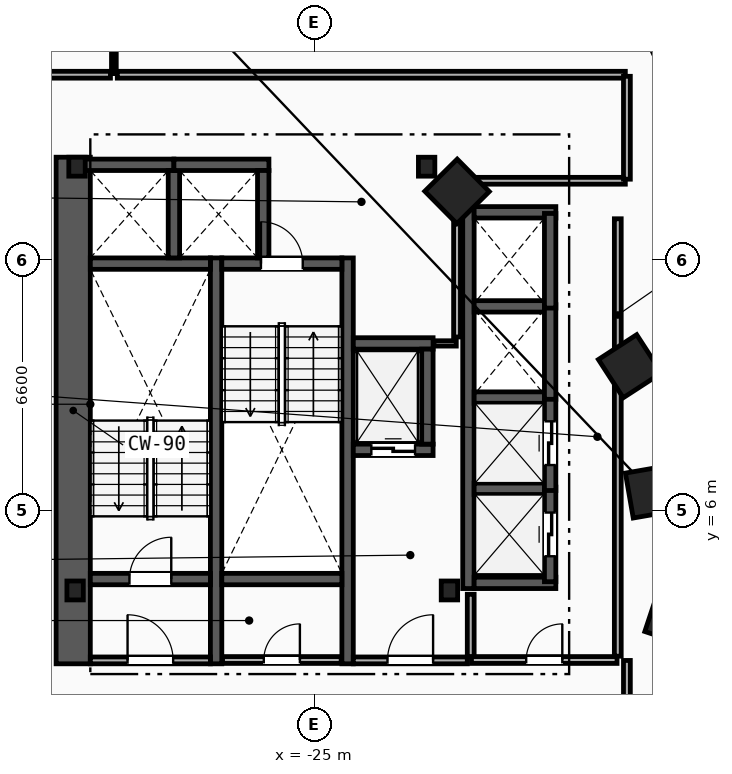
"""IFC4 building model, lengths in metres.
Left out: names, types, materials, properties, quantities, classifications, styles, units other than length and angle.
Written with IfcOpenShell. Run it as: python <this file> out.ifc"""

import sys

from ifc_helpers import new_model, si_unit, direction, frame, frame_2d, origin, origin_2d, place, context, subcontext, project, spatial, rectangle, i_section, extrude, element, fill, save


model = new_model("IFC4")
c1 = context("Model", 3, precision=1e-05, world=origin(), true_north=direction((0.0, 1.0)))
c2 = subcontext(c1, "Body", "Model", "MODEL_VIEW")
j1 = project(units=[si_unit("LENGTHUNIT", "METRE"), si_unit("PLANEANGLEUNIT", "RADIAN")], contexts=[c1])
p1 = place(None, origin())
s1 = spatial("IfcSite", under=j1, at=p1, CompositionType="ELEMENT")
p2 = place(p1, origin())
s2 = spatial("IfcBuilding", under=s1, at=p2, CompositionType="ELEMENT")
p3 = place(p2, frame((0.0, 0.0, 54.4)))
s3 = spatial("IfcBuildingStorey", under=s2, at=p3, CompositionType="ELEMENT", Elevation=54.4)
for number, where, z_axis, x_axis in (
    (1, (-31.3, 3.9, 0.0), (0.0, 0.0, 1.0), (1.0, 0.0, 0.0)),
    (2, (-21.45, 3.9, 0.0), (0.0, 0.0, 1.0), (1.0, 0.0, 0.0)),
    (3, (-22.05, 15.05, 0.0), (0.0, 0.0, 1.0), (1.0, 0.0, 0.0)),
    (4, (-31.25, 15.05, 0.0), (0.0, 0.0, 1.0), (1.0, 0.0, 0.0)),
):
    element("IfcColumn", number, at=place(p3, frame(where, z_axis=z_axis, x_axis=x_axis)), inside=s3, PredefinedType="COLUMN", context=c2, shape_type="SweptSolid", body=[
        extrude(i_section(OverallWidth=0.432, OverallDepth=0.498, WebThickness=0.056, FlangeThickness=0.089, FilletRadius=0.018, at=origin_2d()), origin(), (0.0, 0.0, 1.0), 3.8),
    ])
for number, where, z_axis, x_axis in (
    (5, (-15.55, 3.2, 0.0), (0.0, 0.0, 1.0), (0.315, 0.949, 0.0)),
    (6, (-16.125, 6.5, 0.0), (0.0, 0.0, 1.0), (-0.172, 0.985, 0.0)),
    (7, (-16.7, 9.8, 0.0), (0.0, 0.0, 1.0), (-0.544, 0.839, 0.0)),
    (8, (-21.25, 14.4, 0.0), (0.0, 0.0, 1.0), (-0.703, 0.711, 0.0)),
):
    element("IfcColumn", number, at=place(p3, frame(where, z_axis=z_axis, x_axis=x_axis)), inside=s3, PredefinedType="COLUMN", context=c2, shape_type="SweptSolid", body=[
        extrude(rectangle(XDim=1.2, YDim=1.2, at=origin_2d()), origin(), (0.0, 0.0, 1.0), 3.8),
    ])
p4 = place(p3, frame((-31.35, 1.97, 0.0), z_axis=(0.0, 0.0, 1.0), x_axis=(0.0, 1.0, 0.0)))
e9 = element("IfcWall", 9, at=p4, inside=s3, PredefinedType="SHEAR", context=c2, shape_type="SweptSolid", body=[
    extrude(rectangle(XDim=13.33, YDim=0.9, at=frame_2d((6.665, 0.0))), origin(), (0.0, 0.0, 1.0), 3.5),
])
for number, where, z_axis, x_axis in (
    (10, (-27.59, 1.97, 0.0), (0.0, 0.0, 1.0), (0.0, 1.0, 0.0)),
    (11, (-24.13, 1.97, 0.0), (0.0, 0.0, 1.0), (0.0, 1.0, 0.0)),
):
    element("IfcWall", number, at=place(p3, frame(where, z_axis=z_axis, x_axis=x_axis)), inside=s3, PredefinedType="SHEAR", context=c2, shape_type="SweptSolid", body=[
        extrude(rectangle(XDim=10.68, YDim=0.3, at=frame_2d((5.34, 0.0))), origin(), (0.0, 0.0, 1.0), 3.5),
    ])
p5 = place(p3, frame((-30.9, 4.2, 0.0), z_axis=(0.0, 0.0, 1.0), x_axis=(1.0, 0.0, 0.0)))
e12 = element("IfcWall", 12, at=p5, inside=s3, PredefinedType="SHEAR", context=c2, shape_type="SweptSolid", body=[
    extrude(rectangle(XDim=3.16, YDim=0.3, at=frame_2d((1.58, 0.0))), origin(), (0.0, 0.0, 1.0), 3.5),
])
p6 = place(p5, frame((1.03, 0.0, 0.0)))
e13 = element("IfcOpeningElement", 13, at=p6, cuts=e12, PredefinedType="OPENING", context=c2, shape_type="SweptSolid", body=[
    extrude(rectangle(XDim=1.1, YDim=2.15, at=frame_2d((0.55, 1.075))), frame((0.0, 0.16, 0.0), z_axis=(0.0, -1.0, 0.0), x_axis=(1.0, 0.0, 0.0)), (0.0, 0.0, 1.0), 0.32),
])
p7 = place(p3, frame((-30.9, 12.5, 0.0), z_axis=(0.0, 0.0, 1.0), x_axis=(1.0, 0.0, 0.0)))
e14 = element("IfcWall", 14, at=p7, inside=s3, PredefinedType="SHEAR", context=c2, shape_type="SweptSolid", body=[
    extrude(rectangle(XDim=3.16, YDim=0.3, at=frame_2d((1.58, 0.0))), origin(), (0.0, 0.0, 1.0), 3.5),
])
p8 = place(p3, frame((-27.44, 12.5, 0.0), z_axis=(0.0, 0.0, 1.0), x_axis=(1.0, 0.0, 0.0)))
e15 = element("IfcWall", 15, at=p8, inside=s3, PredefinedType="SHEAR", context=c2, shape_type="SweptSolid", body=[
    extrude(rectangle(XDim=3.16, YDim=0.3, at=frame_2d((1.58, 0.0))), origin(), (0.0, 0.0, 1.0), 3.5),
])
p9 = place(p8, frame((1.03, 0.0, 0.0)))
e16 = element("IfcOpeningElement", 16, at=p9, cuts=e15, PredefinedType="OPENING", context=c2, shape_type="SweptSolid", body=[
    extrude(rectangle(XDim=1.1, YDim=2.15, at=frame_2d((0.55, 1.075))), frame((0.0, 0.16, 0.0), z_axis=(0.0, -1.0, 0.0), x_axis=(1.0, 0.0, 0.0)), (0.0, 0.0, 1.0), 0.32),
])
p10 = place(p3, frame((-27.44, 4.2, 0.0), z_axis=(0.0, 0.0, 1.0), x_axis=(1.0, 0.0, 0.0)))
e17 = element("IfcWall", 17, at=p10, inside=s3, PredefinedType="SHEAR", context=c2, shape_type="SweptSolid", body=[
    extrude(rectangle(XDim=3.16, YDim=0.3, at=frame_2d((1.58, 0.0))), origin(), (0.0, 0.0, 1.0), 3.5),
])
p11 = place(p3, frame((-20.89, 2.15, 0.0), z_axis=(0.0, 0.0, 1.0), x_axis=(0.0, 1.0, 0.0)))
e18 = element("IfcWall", 18, at=p11, inside=s3, PredefinedType="PARTITIONING", context=c2, shape_type="SweptSolid", body=[
    extrude(rectangle(XDim=1.65, YDim=0.18, at=frame_2d((0.825, 0.0))), origin(), (0.0, 0.0, 1.0), 3.5),
])
p12 = place(p3, frame((-23.98, 2.06, 0.0), z_axis=(0.0, 0.0, 1.0), x_axis=(1.0, 0.0, 0.0)))
e19 = element("IfcWall", 19, at=p12, inside=s3, PredefinedType="PARTITIONING", context=c2, shape_type="SweptSolid", body=[
    extrude(rectangle(XDim=3.0, YDim=0.18, at=frame_2d((1.5, 0.0))), origin(), (0.0, 0.0, 1.0), 3.5),
])
p13 = place(p12, frame((0.9, 0.0, 0.0)))
e20 = element("IfcOpeningElement", 20, at=p13, cuts=e19, PredefinedType="OPENING", context=c2, shape_type="SweptSolid", body=[
    extrude(rectangle(XDim=1.2, YDim=2.15, at=frame_2d((0.6, 1.075))), frame((0.0, 0.1, 0.0), z_axis=(0.0, -1.0, 0.0), x_axis=(1.0, 0.0, 0.0)), (0.0, 0.0, 1.0), 0.2),
])
p14 = place(p3, frame((-30.9, 2.06, 0.0), z_axis=(0.0, 0.0, 1.0), x_axis=(1.0, 0.0, 0.0)))
e21 = element("IfcWall", 21, at=p14, inside=s3, PredefinedType="PARTITIONING", context=c2, shape_type="SweptSolid", body=[
    extrude(rectangle(XDim=3.16, YDim=0.18, at=frame_2d((1.58, 0.0))), origin(), (0.0, 0.0, 1.0), 3.5),
])
p15 = place(p14, frame((0.98, 0.0, 0.0)))
e22 = element("IfcOpeningElement", 22, at=p15, cuts=e21, PredefinedType="OPENING", context=c2, shape_type="SweptSolid", body=[
    extrude(rectangle(XDim=1.2, YDim=2.15, at=frame_2d((0.6, 1.075))), frame((0.0, 0.1, 0.0), z_axis=(0.0, -1.0, 0.0), x_axis=(1.0, 0.0, 0.0)), (0.0, 0.0, 1.0), 0.2),
])
p16 = place(p3, frame((-23.98, 7.6, 0.0), z_axis=(0.0, 0.0, 1.0), x_axis=(1.0, 0.0, 0.0)))
e23 = element("IfcWall", 23, at=p16, inside=s3, PredefinedType="SHEAR", context=c2, shape_type="SweptSolid", body=[
    extrude(rectangle(XDim=2.1, YDim=0.3, at=frame_2d((1.05, 0.0))), origin(), (0.0, 0.0, 1.0), 3.5),
])
p17 = place(p16, frame((0.475, 0.0, 0.0)))
e24 = element("IfcOpeningElement", 24, at=p17, cuts=e23, PredefinedType="OPENING", context=c2, shape_type="SweptSolid", body=[
    extrude(rectangle(XDim=1.15, YDim=2.2, at=frame_2d((0.575, 1.1))), frame((0.0, 0.16, 0.0), z_axis=(0.0, -1.0, 0.0), x_axis=(1.0, 0.0, 0.0)), (0.0, 0.0, 1.0), 0.32),
])
p18 = place(p3, frame((-23.98, 10.4, 0.0), z_axis=(0.0, 0.0, 1.0), x_axis=(1.0, 0.0, 0.0)))
e25 = element("IfcWall", 25, at=p18, inside=s3, PredefinedType="SHEAR", context=c2, shape_type="SweptSolid", body=[
    extrude(rectangle(XDim=2.1, YDim=0.3, at=frame_2d((1.05, 0.0))), origin(), (0.0, 0.0, 1.0), 3.5),
])
for number, where, z_axis, x_axis in (
    (26, (-22.03, 7.75, 0.0), (0.0, 0.0, 1.0), (0.0, 1.0, 0.0)),
    (27, (-31.2, 15.1, 0.0), (0.0, 0.0, 1.0), (1.0, 0.0, 0.0)),
):
    element("IfcWall", number, at=place(p3, frame(where, z_axis=z_axis, x_axis=x_axis)), inside=s3, PredefinedType="SHEAR", context=c2, shape_type="SweptSolid", body=[
        extrude(rectangle(XDim=2.5, YDim=0.3, at=frame_2d((1.25, 0.0))), origin(), (0.0, 0.0, 1.0), 3.5),
    ])
p19 = place(p3, frame((-28.7, 12.65, 0.0), z_axis=(0.0, 0.0, 1.0), x_axis=(0.0, 1.0, 0.0)))
e28 = element("IfcWall", 28, at=p19, inside=s3, PredefinedType="SHEAR", context=c2, shape_type="SweptSolid", body=[
    extrude(rectangle(XDim=2.3, YDim=0.3, at=frame_2d((1.15, 0.0))), origin(), (0.0, 0.0, 1.0), 3.5),
])
p20 = place(p3, frame((-28.7, 15.1, 0.0), z_axis=(0.0, 0.0, 1.0), x_axis=(1.0, 0.0, 0.0)))
e29 = element("IfcWall", 29, at=p20, inside=s3, PredefinedType="SHEAR", context=c2, shape_type="SweptSolid", body=[
    extrude(rectangle(XDim=2.5, YDim=0.3, at=frame_2d((1.25, 0.0))), origin(), (0.0, 0.0, 1.0), 3.5),
])
p21 = place(p3, frame((-26.35, 12.65, 0.0), z_axis=(0.0, 0.0, 1.0), x_axis=(0.0, 1.0, 0.0)))
e30 = element("IfcWall", 30, at=p21, inside=s3, PredefinedType="SHEAR", context=c2, shape_type="SweptSolid", body=[
    extrude(rectangle(XDim=2.3, YDim=0.3, at=frame_2d((1.15, 0.0))), origin(), (0.0, 0.0, 1.0), 3.5),
])
p22 = place(p3, frame((-20.95, 3.95, 0.0), z_axis=(0.0, 0.0, 1.0), x_axis=(0.0, 1.0, 0.0)))
e31 = element("IfcWall", 31, at=p22, inside=s3, PredefinedType="SHEAR", context=c2, shape_type="SweptSolid", body=[
    extrude(rectangle(XDim=10.05, YDim=0.3, at=frame_2d((5.025, 0.0))), origin(), (0.0, 0.0, 1.0), 3.5),
])
for number, where, z_axis, x_axis in (
    (32, (-20.8, 4.1, 0.0), (0.0, 0.0, 1.0), (1.0, 0.0, 0.0)),
    (33, (-20.8, 13.85, 0.0), (0.0, 0.0, 1.0), (1.0, 0.0, 0.0)),
):
    element("IfcWall", number, at=place(p3, frame(where, z_axis=z_axis, x_axis=x_axis)), inside=s3, PredefinedType="SHEAR", context=c2, shape_type="SweptSolid", body=[
        extrude(rectangle(XDim=2.15, YDim=0.3, at=frame_2d((1.075, 0.0))), origin(), (0.0, 0.0, 1.0), 3.5),
    ])
for number, where, z_axis, x_axis in (
    (34, (-20.8, 6.575, 0.0), (0.0, 0.0, 1.0), (1.0, 0.0, 0.0)),
    (35, (-20.8, 8.975, 0.0), (0.0, 0.0, 1.0), (1.0, 0.0, 0.0)),
    (36, (-20.8, 11.375, 0.0), (0.0, 0.0, 1.0), (1.0, 0.0, 0.0)),
):
    element("IfcWall", number, at=place(p3, frame(where, z_axis=z_axis, x_axis=x_axis)), inside=s3, PredefinedType="SHEAR", context=c2, shape_type="SweptSolid", body=[
        extrude(rectangle(XDim=1.85, YDim=0.3, at=frame_2d((0.925, 0.0))), origin(), (0.0, 0.0, 1.0), 3.5),
    ])
p23 = place(p3, frame((-18.8, 4.13, 0.0), z_axis=(0.0, 0.0, 1.0), x_axis=(0.0, 1.0, 0.0)))
e37 = element("IfcWall", 37, at=p23, inside=s3, PredefinedType="SHEAR", context=c2, shape_type="SweptSolid", body=[
    extrude(rectangle(XDim=2.49, YDim=0.3, at=frame_2d((1.245, 0.0))), origin(), (0.0, 0.0, 1.0), 3.5),
])
p24 = place(p23, frame((0.67, 0.0, 0.0)))
e38 = element("IfcOpeningElement", 38, at=p24, cuts=e37, PredefinedType="OPENING", context=c2, shape_type="SweptSolid", body=[
    extrude(rectangle(XDim=1.15, YDim=2.2, at=frame_2d((0.575, 1.1))), frame((0.0, 0.16, 0.0), z_axis=(0.0, -1.0, 0.0), x_axis=(1.0, 0.0, 0.0)), (0.0, 0.0, 1.0), 0.32),
])
p25 = place(p3, frame((-18.8, 6.53, 0.0), z_axis=(0.0, 0.0, 1.0), x_axis=(0.0, 1.0, 0.0)))
e39 = element("IfcWall", 39, at=p25, inside=s3, PredefinedType="SHEAR", context=c2, shape_type="SweptSolid", body=[
    extrude(rectangle(XDim=2.49, YDim=0.3, at=frame_2d((1.245, 0.0))), origin(), (0.0, 0.0, 1.0), 3.5),
])
p26 = place(p25, frame((0.67, 0.0, 0.0)))
e40 = element("IfcOpeningElement", 40, at=p26, cuts=e39, PredefinedType="OPENING", context=c2, shape_type="SweptSolid", body=[
    extrude(rectangle(XDim=1.15, YDim=2.2, at=frame_2d((0.575, 1.1))), frame((0.0, 0.16, 0.0), z_axis=(0.0, -1.0, 0.0), x_axis=(1.0, 0.0, 0.0)), (0.0, 0.0, 1.0), 0.32),
])
for number, where, z_axis, x_axis in (
    (41, (-18.8, 8.93, 0.0), (0.0, 0.0, 1.0), (0.0, 1.0, 0.0)),
    (42, (-18.8, 11.33, 0.0), (0.0, 0.0, 1.0), (0.0, 1.0, 0.0)),
):
    element("IfcWall", number, at=place(p3, frame(where, z_axis=z_axis, x_axis=x_axis)), inside=s3, PredefinedType="SHEAR", context=c2, shape_type="SweptSolid", body=[
        extrude(rectangle(XDim=2.49, YDim=0.3, at=frame_2d((1.245, 0.0))), origin(), (0.0, 0.0, 1.0), 3.5),
    ])
p27 = place(p3, frame((-17.02, 2.17, 0.0), z_axis=(0.0, 0.0, 1.0), x_axis=(0.0, 1.0, 0.0)))
e43 = element("IfcWall", 43, at=p27, inside=s3, PredefinedType="PARTITIONING", context=c2, shape_type="SweptSolid", body=[
    extrude(rectangle(XDim=11.51, YDim=0.18, at=frame_2d((5.755, 0.0))), origin(), (0.0, 0.0, 1.0), 3.5),
])
p28 = place(p3, frame((-20.87, 2.07, 0.0), z_axis=(0.0, 0.0, 1.0), x_axis=(1.0, 0.0, 0.0)))
e44 = element("IfcWall", 44, at=p28, inside=s3, PredefinedType="PARTITIONING", context=c2, shape_type="SweptSolid", body=[
    extrude(rectangle(XDim=3.83, YDim=0.18, at=frame_2d((1.915, 0.0))), origin(), (0.0, 0.0, 1.0), 3.5),
])
p29 = place(p28, frame((1.44, 0.0, 0.0)))
e45 = element("IfcOpeningElement", 45, at=p29, cuts=e44, PredefinedType="OPENING", context=c2, shape_type="SweptSolid", body=[
    extrude(rectangle(XDim=0.95, YDim=2.1, at=frame_2d((0.475, 1.05))), frame((0.0, 0.1, 0.0), z_axis=(0.0, -1.0, 0.0), x_axis=(1.0, 0.0, 0.0)), (0.0, 0.0, 1.0), 0.2),
])
p30 = place(p3, frame((-21.86, 10.4, 0.0), z_axis=(0.0, 0.0, 1.0), x_axis=(1.0, 0.0, 0.0)))
e46 = element("IfcWall", 46, at=p30, inside=s3, PredefinedType="PARTITIONING", context=c2, shape_type="SweptSolid", body=[
    extrude(rectangle(XDim=0.59, YDim=0.14, at=frame_2d((0.295, 0.0))), origin(), (0.0, 0.0, 1.0), 3.5),
])
p31 = place(p3, frame((-21.25, 10.57, 0.0), z_axis=(0.0, 0.0, 1.0), x_axis=(0.0, 1.0, 0.0)))
e47 = element("IfcWall", 47, at=p31, inside=s3, PredefinedType="PARTITIONING", context=c2, shape_type="SweptSolid", body=[
    extrude(rectangle(XDim=4.36, YDim=0.18, at=frame_2d((2.18, 0.0))), origin(), (0.0, 0.0, 1.0), 3.5),
])
p32 = place(p3, frame((-27.42, 2.07, 0.0), z_axis=(0.0, 0.0, 1.0), x_axis=(1.0, 0.0, 0.0)))
e48 = element("IfcWall", 48, at=p32, inside=s3, PredefinedType="PARTITIONING", context=c2, shape_type="SweptSolid", body=[
    extrude(rectangle(XDim=3.12, YDim=0.18, at=frame_2d((1.56, 0.0))), origin(), (0.0, 0.0, 1.0), 3.5),
])
p33 = place(p32, frame((1.085, 0.0, 0.0)))
e49 = element("IfcOpeningElement", 49, at=p33, cuts=e48, PredefinedType="OPENING", context=c2, shape_type="SweptSolid", body=[
    extrude(rectangle(XDim=0.95, YDim=2.1, at=frame_2d((0.475, 1.05))), frame((0.0, 0.1, 0.0), z_axis=(0.0, -1.0, 0.0), x_axis=(1.0, 0.0, 0.0)), (0.0, 0.0, 1.0), 0.2),
])
p34 = place(p3, frame((-30.28, 17.5, 0.0), z_axis=(0.0, 0.0, 1.0), x_axis=(0.0, 1.0, 0.0)))
e50 = element("IfcWall", 50, at=p34, inside=s3, PredefinedType="PARTITIONING", context=c2, shape_type="SweptSolid", body=[
    extrude(rectangle(XDim=8.485, YDim=0.125, at=frame_2d((4.243, 0.0))), origin(), (0.0, 0.0, 1.0), 3.5),
])
p35 = place(p3, frame((-16.822, 17.47, 0.0), z_axis=(0.0, 0.0, 1.0), x_axis=(-1.0, 0.0, 0.0)))
e51 = element("IfcWall", 51, at=p35, inside=s3, PredefinedType="PARTITIONING", context=c2, shape_type="SweptSolid", body=[
    extrude(rectangle(XDim=13.368, YDim=0.18, at=frame_2d((6.684, 0.0))), origin(), (0.0, 0.0, 1.0), 3.5),
])
p36 = place(p3, frame((-21.178, 14.68, 0.0), z_axis=(0.0, 0.0, 1.0), x_axis=(1.0, 0.0, 0.0)))
e52 = element("IfcWall", 52, at=p36, inside=s3, PredefinedType="PARTITIONING", context=c2, shape_type="SweptSolid", body=[
    extrude(rectangle(XDim=4.357, YDim=0.18, at=frame_2d((2.178, 0.0))), origin(), (0.0, 0.0, 1.0), 3.5),
])
p37 = place(p3, frame((-16.78, 14.721, 0.0), z_axis=(0.0, 0.0, 1.0), x_axis=(0.0, 1.0, 0.0)))
e53 = element("IfcWall", 53, at=p37, inside=s3, PredefinedType="PARTITIONING", context=c2, shape_type="SweptSolid", body=[
    extrude(rectangle(XDim=2.707, YDim=0.18, at=frame_2d((1.354, 0.0))), origin(), (0.0, 0.0, 1.0), 3.5),
])
p38 = place(p3, frame((-16.78, -0.329, 0.0), z_axis=(0.0, 0.0, 1.0), x_axis=(0.0, 1.0, 0.0)))
e54 = element("IfcWall", 54, at=p38, inside=s3, PredefinedType="PARTITIONING", context=c2, shape_type="SweptSolid", body=[
    extrude(rectangle(XDim=2.387, YDim=0.18, at=frame_2d((1.194, 0.0))), origin(), (0.0, 0.0, 1.0), 3.5),
])
p39 = place(p3, frame((-30.37, 17.47, 0.0), z_axis=(0.0, 0.0, 1.0), x_axis=(-1.0, 0.0, 0.0)))
e55 = element("IfcWall", 55, at=p39, inside=s3, PredefinedType="PARTITIONING", context=c2, shape_type="SweptSolid", body=[
    extrude(rectangle(XDim=3.258, YDim=0.18, at=frame_2d((1.629, 0.0))), origin(), (0.0, 0.0, 1.0), 3.5),
])
p40 = place(p6, origin())
e56 = element("IfcDoor", 56, at=p40, inside=s3, OperationType="SINGLE_SWING_RIGHT", PredefinedType="DOOR", context=c2, shape_type="SweptSolid", body=[
    extrude(rectangle(XDim=1.1, YDim=2.15, at=frame_2d((0.55, 1.075))), frame((0.0, 0.025, 0.0), z_axis=(0.0, -1.0, 0.0), x_axis=(1.0, 0.0, 0.0)), (0.0, 0.0, 1.0), 0.05),
])
fill(e13, e56)
p41 = place(p9, origin())
e57 = element("IfcDoor", 57, at=p41, inside=s3, OperationType="SINGLE_SWING_LEFT", PredefinedType="DOOR", context=c2, shape_type="SweptSolid", body=[
    extrude(rectangle(XDim=1.1, YDim=2.15, at=frame_2d((0.55, 1.075))), frame((0.0, 0.025, 0.0), z_axis=(0.0, -1.0, 0.0), x_axis=(1.0, 0.0, 0.0)), (0.0, 0.0, 1.0), 0.05),
])
fill(e16, e57)
p42 = place(p13, origin())
e58 = element("IfcDoor", 58, at=p42, inside=s3, OperationType="SINGLE_SWING_RIGHT", PredefinedType="DOOR", context=c2, shape_type="SweptSolid", body=[
    extrude(rectangle(XDim=1.2, YDim=2.15, at=frame_2d((0.6, 1.075))), frame((0.0, 0.025, 0.0), z_axis=(0.0, -1.0, 0.0), x_axis=(1.0, 0.0, 0.0)), (0.0, 0.0, 1.0), 0.05),
])
fill(e20, e58)
p43 = place(p15, origin())
e59 = element("IfcDoor", 59, at=p43, inside=s3, OperationType="SINGLE_SWING_LEFT", PredefinedType="DOOR", context=c2, shape_type="SweptSolid", body=[
    extrude(rectangle(XDim=1.2, YDim=2.15, at=frame_2d((0.6, 1.075))), frame((0.0, 0.025, 0.0), z_axis=(0.0, -1.0, 0.0), x_axis=(1.0, 0.0, 0.0)), (0.0, 0.0, 1.0), 0.05),
])
fill(e22, e59)
p44 = place(p17, origin())
e60 = element("IfcDoor", 60, at=p44, inside=s3, OperationType="SLIDING_TO_LEFT", PredefinedType="TRAPDOOR", context=c2, shape_type="SweptSolid", body=[
    extrude(rectangle(XDim=1.15, YDim=2.2, at=frame_2d((0.575, 1.1))), frame((0.0, 0.025, 0.0), z_axis=(0.0, -1.0, 0.0), x_axis=(1.0, 0.0, 0.0)), (0.0, 0.0, 1.0), 0.05),
])
fill(e24, e60)
p45 = place(p24, origin())
e61 = element("IfcDoor", 61, at=p45, inside=s3, OperationType="SLIDING_TO_LEFT", PredefinedType="TRAPDOOR", context=c2, shape_type="SweptSolid", body=[
    extrude(rectangle(XDim=1.15, YDim=2.2, at=frame_2d((0.575, 1.1))), frame((0.0, 0.025, 0.0), z_axis=(0.0, -1.0, 0.0), x_axis=(1.0, 0.0, 0.0)), (0.0, 0.0, 1.0), 0.05),
])
fill(e38, e61)
p46 = place(p26, origin())
e62 = element("IfcDoor", 62, at=p46, inside=s3, OperationType="SLIDING_TO_LEFT", PredefinedType="TRAPDOOR", context=c2, shape_type="SweptSolid", body=[
    extrude(rectangle(XDim=1.15, YDim=2.2, at=frame_2d((0.575, 1.1))), frame((0.0, 0.025, 0.0), z_axis=(0.0, -1.0, 0.0), x_axis=(1.0, 0.0, 0.0)), (0.0, 0.0, 1.0), 0.05),
])
fill(e40, e62)
p47 = place(p29, origin())
e63 = element("IfcDoor", 63, at=p47, inside=s3, OperationType="SINGLE_SWING_RIGHT", PredefinedType="DOOR", context=c2, shape_type="SweptSolid", body=[
    extrude(rectangle(XDim=0.95, YDim=2.1, at=frame_2d((0.475, 1.05))), frame((0.0, 0.025, 0.0), z_axis=(0.0, -1.0, 0.0), x_axis=(1.0, 0.0, 0.0)), (0.0, 0.0, 1.0), 0.05),
])
fill(e45, e63)
p48 = place(p33, origin())
e64 = element("IfcDoor", 64, at=p48, inside=s3, OperationType="SINGLE_SWING_RIGHT", PredefinedType="DOOR", context=c2, shape_type="SweptSolid", body=[
    extrude(rectangle(XDim=0.95, YDim=2.1, at=frame_2d((0.475, 1.05))), frame((0.0, 0.025, 0.0), z_axis=(0.0, -1.0, 0.0), x_axis=(1.0, 0.0, 0.0)), (0.0, 0.0, 1.0), 0.05),
])
fill(e49, e64)
save(model, sys.argv[1])
